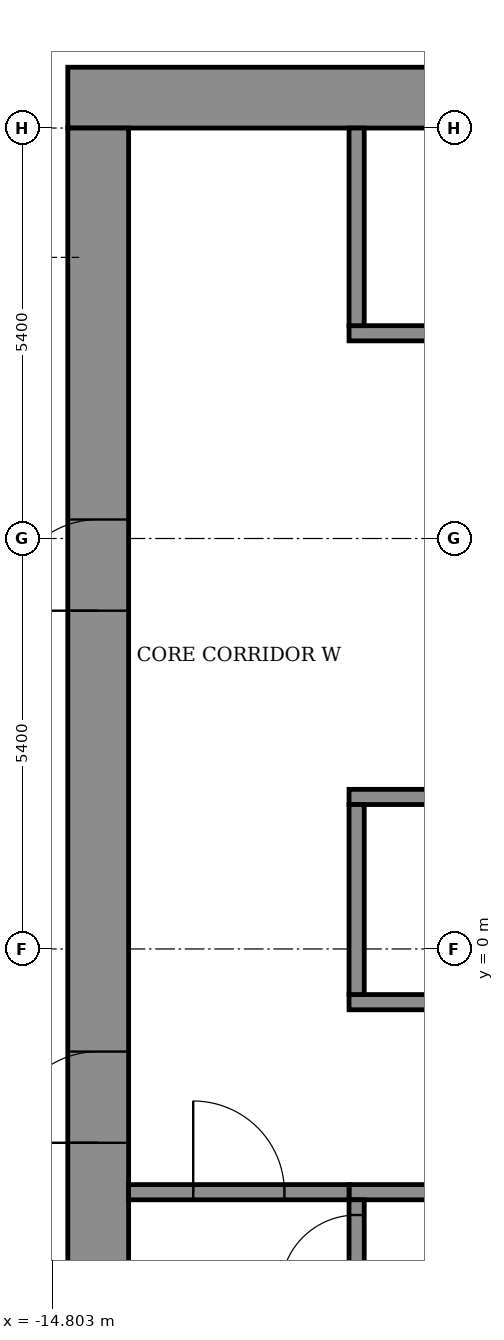
"""IFC4 building model, lengths in metres.
Left out: names, types, materials, properties, quantities, classifications, styles, units other than length and angle.
Written with IfcOpenShell. Run it as: python <this file> out.ifc"""

import sys

from ifc_helpers import new_model, si_unit, direction, frame, frame_2d, origin, place, context, subcontext, project, spatial, rectangle, extrude, element, fill, save


model = new_model("IFC4")
c1 = context("Model", 3, precision=1e-05, world=origin(), true_north=direction((0.0, 1.0)))
c2 = subcontext(c1, "Body", "Model", "MODEL_VIEW")
j1 = project(units=[si_unit("LENGTHUNIT", "METRE"), si_unit("PLANEANGLEUNIT", "RADIAN")], contexts=[c1])
p1 = place(None, origin())
s1 = spatial("IfcSite", under=j1, at=p1, CompositionType="ELEMENT")
p2 = place(p1, origin())
s2 = spatial("IfcBuilding", under=s1, at=p2, CompositionType="ELEMENT")
p3 = place(p2, frame((0.0, 0.0, 219.5)))
s3 = spatial("IfcBuildingStorey", under=s2, at=p3, CompositionType="ELEMENT", Elevation=219.5)
p4 = place(p3, frame((-14.6, 11.2, 0.0), z_axis=(0.0, 0.0, 1.0), x_axis=(1.0, 0.0, 0.0)))
e1 = element("IfcWall", 1, at=p4, inside=s3, PredefinedType="SHEAR", context=c2, shape_type="SweptSolid", body=[
    extrude(rectangle(XDim=29.2, YDim=0.8, at=frame_2d((14.6, 0.0))), origin(), (0.0, 0.0, 1.0), 7.0),
])
p5 = place(p3, frame((-14.2, -10.8, 0.0), z_axis=(0.0, 0.0, 1.0), x_axis=(0.0, 1.0, 0.0)))
e2 = element("IfcWall", 2, at=p5, inside=s3, PredefinedType="SHEAR", context=c2, shape_type="SweptSolid", body=[
    extrude(rectangle(XDim=21.6, YDim=0.8, at=frame_2d((10.8, 0.0))), origin(), (0.0, 0.0, 1.0), 7.0),
])
p6 = place(p5, frame((8.25, 0.0, 0.0)))
e3 = element("IfcOpeningElement", 3, at=p6, cuts=e2, PredefinedType="OPENING", context=c2, shape_type="SweptSolid", body=[
    extrude(rectangle(XDim=1.2, YDim=2.1, at=frame_2d((0.6, 1.05))), frame((0.0, 0.41, 0.0), z_axis=(0.0, -1.0, 0.0), x_axis=(1.0, 0.0, 0.0)), (0.0, 0.0, 1.0), 0.82),
])
p7 = place(p5, frame((15.25, 0.0, 0.0)))
e4 = element("IfcOpeningElement", 4, at=p7, cuts=e2, PredefinedType="OPENING", context=c2, shape_type="SweptSolid", body=[
    extrude(rectangle(XDim=1.2, YDim=2.1, at=frame_2d((0.6, 1.05))), frame((0.0, 0.41, 0.0), z_axis=(0.0, -1.0, 0.0), x_axis=(1.0, 0.0, 0.0)), (0.0, 0.0, 1.0), 0.82),
])
p8 = place(p5, frame((3.2, 0.0, 0.0)))
e5 = element("IfcOpeningElement", 5, at=p8, cuts=e2, PredefinedType="OPENING", context=c2, shape_type="SweptSolid", body=[
    extrude(rectangle(XDim=1.2, YDim=2.1, at=frame_2d((0.6, 1.05))), frame((0.0, 0.41, 0.0), z_axis=(0.0, -1.0, 0.0), x_axis=(1.0, 0.0, 0.0)), (0.0, 0.0, 1.0), 0.82),
])
p9 = place(p3, frame((-10.9, -3.2, 0.0), z_axis=(0.0, 0.0, 1.0), x_axis=(1.0, 0.0, 0.0)))
e6 = element("IfcWall", 6, at=p9, inside=s3, PredefinedType="SHEAR", context=c2, shape_type="SweptSolid", body=[
    extrude(rectangle(XDim=21.8, YDim=0.2, at=frame_2d((10.9, 0.0))), origin(), (0.0, 0.0, 1.0), 6.45),
])
p10 = place(p9, frame((1.075, 0.0, 0.0)))
e7 = element("IfcOpeningElement", 7, at=p10, cuts=e6, PredefinedType="OPENING", context=c2, shape_type="SweptSolid", body=[
    extrude(rectangle(XDim=1.1, YDim=2.1, at=frame_2d((0.55, 1.05))), frame((0.0, 0.11, 0.0), z_axis=(0.0, -1.0, 0.0), x_axis=(1.0, 0.0, 0.0)), (0.0, 0.0, 1.0), 0.22),
])
p11 = place(p9, frame((10.325, 0.0, 0.0)))
e8 = element("IfcOpeningElement", 8, at=p11, cuts=e6, PredefinedType="OPENING", context=c2, shape_type="SweptSolid", body=[
    extrude(rectangle(XDim=1.1, YDim=2.1, at=frame_2d((0.55, 1.05))), frame((0.0, 0.11, 0.0), z_axis=(0.0, -1.0, 0.0), x_axis=(1.0, 0.0, 0.0)), (0.0, 0.0, 1.0), 0.22),
])
p12 = place(p9, frame((19.625, 0.0, 0.0)))
e9 = element("IfcOpeningElement", 9, at=p12, cuts=e6, PredefinedType="OPENING", context=c2, shape_type="SweptSolid", body=[
    extrude(rectangle(XDim=1.1, YDim=2.1, at=frame_2d((0.55, 1.05))), frame((0.0, 0.11, 0.0), z_axis=(0.0, -1.0, 0.0), x_axis=(1.0, 0.0, 0.0)), (0.0, 0.0, 1.0), 0.22),
])
p13 = place(p9, frame((5.7, 0.0, 0.0)))
e10 = element("IfcOpeningElement", 10, at=p13, cuts=e6, PredefinedType="OPENING", context=c2, shape_type="SweptSolid", body=[
    extrude(rectangle(XDim=1.1, YDim=2.1, at=frame_2d((0.55, 1.05))), frame((0.0, 0.11, 0.0), z_axis=(0.0, -1.0, 0.0), x_axis=(1.0, 0.0, 0.0)), (0.0, 0.0, 1.0), 0.22),
])
p14 = place(p9, frame((14.975, 0.0, 0.0)))
e11 = element("IfcOpeningElement", 11, at=p14, cuts=e6, PredefinedType="OPENING", context=c2, shape_type="SweptSolid", body=[
    extrude(rectangle(XDim=1.1, YDim=2.1, at=frame_2d((0.55, 1.05))), frame((0.0, 0.11, 0.0), z_axis=(0.0, -1.0, 0.0), x_axis=(1.0, 0.0, 0.0)), (0.0, 0.0, 1.0), 0.22),
])
p15 = place(p3, frame((-10.9, -0.7, 0.0), z_axis=(0.0, 0.0, 1.0), x_axis=(1.0, 0.0, 0.0)))
e12 = element("IfcWall", 12, at=p15, inside=s3, PredefinedType="SHEAR", context=c2, shape_type="SweptSolid", body=[
    extrude(rectangle(XDim=21.8, YDim=0.2, at=frame_2d((10.9, 0.0))), origin(), (0.0, 0.0, 1.0), 6.45),
])
p16 = place(p3, frame((-10.9, 2.0, 0.0), z_axis=(0.0, 0.0, 1.0), x_axis=(1.0, 0.0, 0.0)))
e13 = element("IfcWall", 13, at=p16, inside=s3, PredefinedType="SHEAR", context=c2, shape_type="SweptSolid", body=[
    extrude(rectangle(XDim=21.8, YDim=0.2, at=frame_2d((10.9, 0.0))), origin(), (0.0, 0.0, 1.0), 6.45),
])
p17 = place(p16, frame((4.95, 0.0, 0.0)))
e14 = element("IfcOpeningElement", 14, at=p17, cuts=e13, PredefinedType="OPENING", context=c2, shape_type="SweptSolid", body=[
    extrude(rectangle(XDim=1.1, YDim=2.1, at=frame_2d((0.55, 1.05))), frame((0.0, 0.11, 0.0), z_axis=(0.0, -1.0, 0.0), x_axis=(1.0, 0.0, 0.0)), (0.0, 0.0, 1.0), 0.22),
])
p18 = place(p16, frame((7.65, 0.0, 0.0)))
e15 = element("IfcOpeningElement", 15, at=p18, cuts=e13, PredefinedType="OPENING", context=c2, shape_type="SweptSolid", body=[
    extrude(rectangle(XDim=1.1, YDim=2.1, at=frame_2d((0.55, 1.05))), frame((0.0, 0.11, 0.0), z_axis=(0.0, -1.0, 0.0), x_axis=(1.0, 0.0, 0.0)), (0.0, 0.0, 1.0), 0.22),
])
p19 = place(p16, frame((10.35, 0.0, 0.0)))
e16 = element("IfcOpeningElement", 16, at=p19, cuts=e13, PredefinedType="OPENING", context=c2, shape_type="SweptSolid", body=[
    extrude(rectangle(XDim=1.1, YDim=2.1, at=frame_2d((0.55, 1.05))), frame((0.0, 0.11, 0.0), z_axis=(0.0, -1.0, 0.0), x_axis=(1.0, 0.0, 0.0)), (0.0, 0.0, 1.0), 0.22),
])
p20 = place(p16, frame((14.4, 0.0, 0.0)))
e17 = element("IfcOpeningElement", 17, at=p20, cuts=e13, PredefinedType="OPENING", context=c2, shape_type="SweptSolid", body=[
    extrude(rectangle(XDim=1.1, YDim=2.1, at=frame_2d((0.55, 1.05))), frame((0.0, 0.11, 0.0), z_axis=(0.0, -1.0, 0.0), x_axis=(1.0, 0.0, 0.0)), (0.0, 0.0, 1.0), 0.22),
])
p21 = place(p16, frame((17.1, 0.0, 0.0)))
e18 = element("IfcOpeningElement", 18, at=p21, cuts=e13, PredefinedType="OPENING", context=c2, shape_type="SweptSolid", body=[
    extrude(rectangle(XDim=1.1, YDim=2.1, at=frame_2d((0.55, 1.05))), frame((0.0, 0.11, 0.0), z_axis=(0.0, -1.0, 0.0), x_axis=(1.0, 0.0, 0.0)), (0.0, 0.0, 1.0), 0.22),
])
p22 = place(p16, frame((19.8, 0.0, 0.0)))
e19 = element("IfcOpeningElement", 19, at=p22, cuts=e13, PredefinedType="OPENING", context=c2, shape_type="SweptSolid", body=[
    extrude(rectangle(XDim=1.1, YDim=2.1, at=frame_2d((0.55, 1.05))), frame((0.0, 0.11, 0.0), z_axis=(0.0, -1.0, 0.0), x_axis=(1.0, 0.0, 0.0)), (0.0, 0.0, 1.0), 0.22),
])
p23 = place(p16, frame((1.675, 0.0, 0.0)))
e20 = element("IfcOpeningElement", 20, at=p23, cuts=e13, PredefinedType="OPENING", context=c2, shape_type="SweptSolid", body=[
    extrude(rectangle(XDim=0.9, YDim=2.1, at=frame_2d((0.45, 1.05))), frame((0.0, 0.11, 0.0), z_axis=(0.0, -1.0, 0.0), x_axis=(1.0, 0.0, 0.0)), (0.0, 0.0, 1.0), 0.22),
])
p24 = place(p16, frame((12.475, 0.0, 0.0)))
e21 = element("IfcOpeningElement", 21, at=p24, cuts=e13, PredefinedType="OPENING", context=c2, shape_type="SweptSolid", body=[
    extrude(rectangle(XDim=0.9, YDim=2.1, at=frame_2d((0.45, 1.05))), frame((0.0, 0.11, 0.0), z_axis=(0.0, -1.0, 0.0), x_axis=(1.0, 0.0, 0.0)), (0.0, 0.0, 1.0), 0.22),
])
p25 = place(p3, frame((-10.9, 8.1, 0.0), z_axis=(0.0, 0.0, 1.0), x_axis=(1.0, 0.0, 0.0)))
e22 = element("IfcWall", 22, at=p25, inside=s3, PredefinedType="SHEAR", context=c2, shape_type="SweptSolid", body=[
    extrude(rectangle(XDim=21.8, YDim=0.2, at=frame_2d((10.9, 0.0))), origin(), (0.0, 0.0, 1.0), 6.45),
])
p26 = place(p25, frame((4.95, 0.0, 0.0)))
e23 = element("IfcOpeningElement", 23, at=p26, cuts=e22, PredefinedType="OPENING", context=c2, shape_type="SweptSolid", body=[
    extrude(rectangle(XDim=1.1, YDim=2.1, at=frame_2d((0.55, 1.05))), frame((0.0, 0.11, 0.0), z_axis=(0.0, -1.0, 0.0), x_axis=(1.0, 0.0, 0.0)), (0.0, 0.0, 1.0), 0.22),
])
p27 = place(p25, frame((7.65, 0.0, 0.0)))
e24 = element("IfcOpeningElement", 24, at=p27, cuts=e22, PredefinedType="OPENING", context=c2, shape_type="SweptSolid", body=[
    extrude(rectangle(XDim=1.1, YDim=2.1, at=frame_2d((0.55, 1.05))), frame((0.0, 0.11, 0.0), z_axis=(0.0, -1.0, 0.0), x_axis=(1.0, 0.0, 0.0)), (0.0, 0.0, 1.0), 0.22),
])
p28 = place(p25, frame((10.35, 0.0, 0.0)))
e25 = element("IfcOpeningElement", 25, at=p28, cuts=e22, PredefinedType="OPENING", context=c2, shape_type="SweptSolid", body=[
    extrude(rectangle(XDim=1.1, YDim=2.1, at=frame_2d((0.55, 1.05))), frame((0.0, 0.11, 0.0), z_axis=(0.0, -1.0, 0.0), x_axis=(1.0, 0.0, 0.0)), (0.0, 0.0, 1.0), 0.22),
])
p29 = place(p25, frame((14.4, 0.0, 0.0)))
e26 = element("IfcOpeningElement", 26, at=p29, cuts=e22, PredefinedType="OPENING", context=c2, shape_type="SweptSolid", body=[
    extrude(rectangle(XDim=1.1, YDim=2.1, at=frame_2d((0.55, 1.05))), frame((0.0, 0.11, 0.0), z_axis=(0.0, -1.0, 0.0), x_axis=(1.0, 0.0, 0.0)), (0.0, 0.0, 1.0), 0.22),
])
p30 = place(p25, frame((17.1, 0.0, 0.0)))
e27 = element("IfcOpeningElement", 27, at=p30, cuts=e22, PredefinedType="OPENING", context=c2, shape_type="SweptSolid", body=[
    extrude(rectangle(XDim=1.1, YDim=2.1, at=frame_2d((0.55, 1.05))), frame((0.0, 0.11, 0.0), z_axis=(0.0, -1.0, 0.0), x_axis=(1.0, 0.0, 0.0)), (0.0, 0.0, 1.0), 0.22),
])
p31 = place(p25, frame((19.8, 0.0, 0.0)))
e28 = element("IfcOpeningElement", 28, at=p31, cuts=e22, PredefinedType="OPENING", context=c2, shape_type="SweptSolid", body=[
    extrude(rectangle(XDim=1.1, YDim=2.1, at=frame_2d((0.55, 1.05))), frame((0.0, 0.11, 0.0), z_axis=(0.0, -1.0, 0.0), x_axis=(1.0, 0.0, 0.0)), (0.0, 0.0, 1.0), 0.22),
])
p32 = place(p25, frame((1.675, 0.0, 0.0)))
e29 = element("IfcOpeningElement", 29, at=p32, cuts=e22, PredefinedType="OPENING", context=c2, shape_type="SweptSolid", body=[
    extrude(rectangle(XDim=0.9, YDim=2.1, at=frame_2d((0.45, 1.05))), frame((0.0, 0.11, 0.0), z_axis=(0.0, -1.0, 0.0), x_axis=(1.0, 0.0, 0.0)), (0.0, 0.0, 1.0), 0.22),
])
p33 = place(p25, frame((12.475, 0.0, 0.0)))
e30 = element("IfcOpeningElement", 30, at=p33, cuts=e22, PredefinedType="OPENING", context=c2, shape_type="SweptSolid", body=[
    extrude(rectangle(XDim=0.9, YDim=2.1, at=frame_2d((0.45, 1.05))), frame((0.0, 0.11, 0.0), z_axis=(0.0, -1.0, 0.0), x_axis=(1.0, 0.0, 0.0)), (0.0, 0.0, 1.0), 0.22),
])
p34 = place(p3, frame((-10.8, -10.8, 0.0), z_axis=(0.0, 0.0, 1.0), x_axis=(0.0, 1.0, 0.0)))
e31 = element("IfcWall", 31, at=p34, inside=s3, PredefinedType="SHEAR", context=c2, shape_type="SweptSolid", body=[
    extrude(rectangle(XDim=7.5, YDim=0.2, at=frame_2d((3.75, 0.0))), origin(), (0.0, 0.0, 1.0), 6.45),
])
p35 = place(p34, frame((6.3, 0.0, 0.0)))
e32 = element("IfcOpeningElement", 32, at=p35, cuts=e31, PredefinedType="OPENING", context=c2, shape_type="SweptSolid", body=[
    extrude(rectangle(XDim=1.0, YDim=2.1, at=frame_2d((0.5, 1.05))), frame((0.0, 0.11, 0.0), z_axis=(0.0, -1.0, 0.0), x_axis=(1.0, 0.0, 0.0)), (0.0, 0.0, 1.0), 0.22),
])
p36 = place(p3, frame((-10.8, -0.6, 0.0), z_axis=(0.0, 0.0, 1.0), x_axis=(0.0, 1.0, 0.0)))
e33 = element("IfcWall", 33, at=p36, inside=s3, PredefinedType="STANDARD", context=c2, shape_type="SweptSolid", body=[
    extrude(rectangle(XDim=2.5, YDim=0.2, at=frame_2d((1.25, 0.0))), origin(), (0.0, 0.0, 1.0), 6.45),
])
p37 = place(p3, frame((-10.8, 8.2, 0.0), z_axis=(0.0, 0.0, 1.0), x_axis=(0.0, 1.0, 0.0)))
e34 = element("IfcWall", 34, at=p37, inside=s3, PredefinedType="STANDARD", context=c2, shape_type="SweptSolid", body=[
    extrude(rectangle(XDim=2.6, YDim=0.2, at=frame_2d((1.3, 0.0))), origin(), (0.0, 0.0, 1.0), 6.45),
])
p38 = place(p3, frame((-13.8, -3.2, 0.0), z_axis=(0.0, 0.0, 1.0), x_axis=(1.0, 0.0, 0.0)))
e35 = element("IfcWall", 35, at=p38, inside=s3, PredefinedType="STANDARD", context=c2, shape_type="SweptSolid", body=[
    extrude(rectangle(XDim=2.9, YDim=0.2, at=frame_2d((1.45, 0.0))), origin(), (0.0, 0.0, 1.0), 6.45),
])
p39 = place(p38, frame((0.85, 0.0, 0.0)))
e36 = element("IfcOpeningElement", 36, at=p39, cuts=e35, PredefinedType="OPENING", context=c2, shape_type="SweptSolid", body=[
    extrude(rectangle(XDim=1.2, YDim=2.1, at=frame_2d((0.6, 1.05))), frame((0.0, 0.11, 0.0), z_axis=(0.0, -1.0, 0.0), x_axis=(1.0, 0.0, 0.0)), (0.0, 0.0, 1.0), 0.22),
])
p40 = place(p6, origin())
e37 = element("IfcDoor", 37, at=p40, inside=s3, OperationType="DOUBLE_DOOR_SINGLE_SWING", PredefinedType="DOOR", context=c2, shape_type="SweptSolid", body=[
    extrude(rectangle(XDim=1.2, YDim=2.1, at=frame_2d((0.6, 1.05))), frame((0.0, 0.025, 0.0), z_axis=(0.0, -1.0, 0.0), x_axis=(1.0, 0.0, 0.0)), (0.0, 0.0, 1.0), 0.05),
])
fill(e3, e37)
p41 = place(p7, origin())
e38 = element("IfcDoor", 38, at=p41, inside=s3, OperationType="DOUBLE_DOOR_SINGLE_SWING", PredefinedType="DOOR", context=c2, shape_type="SweptSolid", body=[
    extrude(rectangle(XDim=1.2, YDim=2.1, at=frame_2d((0.6, 1.05))), frame((0.0, 0.025, 0.0), z_axis=(0.0, -1.0, 0.0), x_axis=(1.0, 0.0, 0.0)), (0.0, 0.0, 1.0), 0.05),
])
fill(e4, e38)
p42 = place(p39, origin())
e39 = element("IfcDoor", 39, at=p42, inside=s3, OperationType="SINGLE_SWING_LEFT", PredefinedType="DOOR", context=c2, shape_type="SweptSolid", body=[
    extrude(rectangle(XDim=1.2, YDim=2.1, at=frame_2d((0.6, 1.05))), frame((0.0, 0.025, 0.0), z_axis=(0.0, -1.0, 0.0), x_axis=(1.0, 0.0, 0.0)), (0.0, 0.0, 1.0), 0.05),
])
fill(e36, e39)
p43 = place(p35, origin())
e40 = element("IfcDoor", 40, at=p43, inside=s3, OperationType="SINGLE_SWING_RIGHT", PredefinedType="DOOR", context=c2, shape_type="SweptSolid", body=[
    extrude(rectangle(XDim=1.0, YDim=2.1, at=frame_2d((0.5, 1.05))), frame((0.0, 0.025, 0.0), z_axis=(0.0, -1.0, 0.0), x_axis=(1.0, 0.0, 0.0)), (0.0, 0.0, 1.0), 0.05),
])
fill(e32, e40)
save(model, sys.argv[1])
